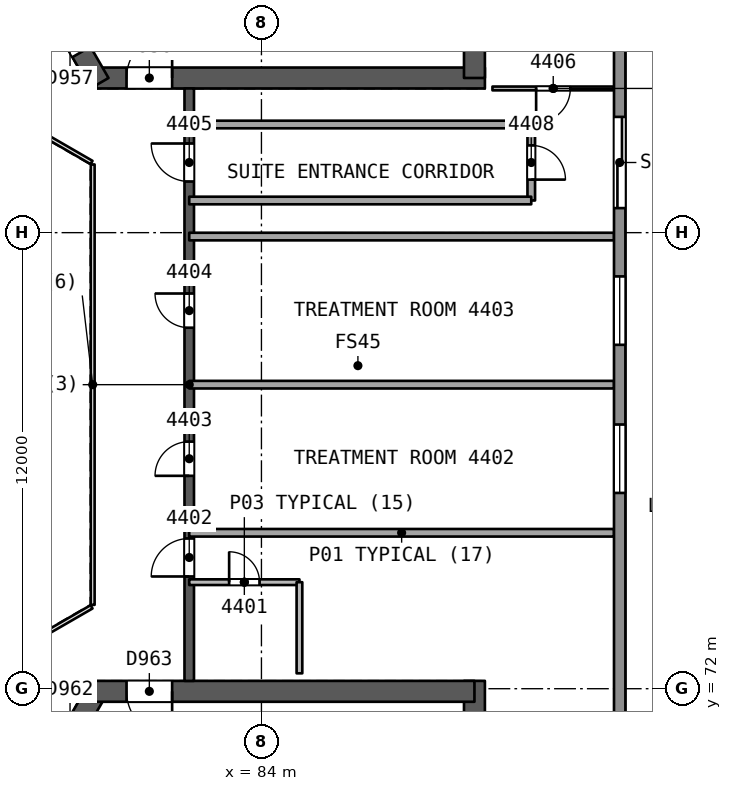
"""IFC4 building model, lengths in metres.
Left out: names, types, materials, properties, quantities, classifications, styles, units other than length and angle.
Written with IfcOpenShell. Run it as: python <this file> out.ifc"""

import sys

from ifc_helpers import new_model, si_unit, direction, frame, frame_2d, origin, place, context, subcontext, project, spatial, rectangle, extrude, element, fill, save


model = new_model("IFC4")
c1 = context("Model", 3, precision=1e-05, world=origin(), true_north=direction((0.0, 1.0)))
c2 = subcontext(c1, "Body", "Model", "MODEL_VIEW")
j1 = project(units=[si_unit("LENGTHUNIT", "METRE"), si_unit("PLANEANGLEUNIT", "RADIAN")], contexts=[c1])
p1 = place(None, origin())
s1 = spatial("IfcSite", under=j1, at=p1, CompositionType="ELEMENT")
p2 = place(p1, origin())
s2 = spatial("IfcBuilding", under=s1, at=p2, CompositionType="ELEMENT")
p3 = place(p2, frame((0.0, 0.0, 182.2)))
s3 = spatial("IfcBuildingStorey", under=s2, at=p3, CompositionType="ELEMENT", Elevation=182.2)
p4 = place(p3, frame((79.659, 88.069, 0.0), z_axis=(0.0, 0.0, 1.0), x_axis=(1.0, 0.0, 0.0)))
e1 = element("IfcWall", 1, at=p4, inside=s3, PredefinedType="SHEAR", context=c2, shape_type="SweptSolid", body=[
    extrude(rectangle(XDim=10.221, YDim=0.55, at=frame_2d((5.111, 0.0))), origin(), (0.0, 0.0, 1.0), 3.7),
])
p5 = place(p4, frame((0.791, 0.0, 0.0)))
e2 = element("IfcOpeningElement", 2, at=p5, cuts=e1, PredefinedType="OPENING", context=c2, shape_type="SweptSolid", body=[
    extrude(rectangle(XDim=1.2, YDim=2.1, at=frame_2d((0.6, 1.05))), frame((0.0, 0.286, 0.0), z_axis=(0.0, -1.0, 0.0), x_axis=(1.0, 0.0, 0.0)), (0.0, 0.0, 1.0), 0.571),
])
p6 = place(p3, frame((89.605, 88.069, 0.0), z_axis=(0.0, 0.0, 1.0), x_axis=(0.0, 1.0, 0.0)))
e3 = element("IfcWall", 3, at=p6, inside=s3, PredefinedType="SHEAR", context=c2, shape_type="SweptSolid", body=[
    extrude(rectangle(XDim=14.058, YDim=0.55, at=frame_2d((7.029, 0.0))), origin(), (0.0, 0.0, 1.0), 3.7),
])
p7 = place(p3, frame((74.686, 96.683, 0.0), z_axis=(0.0, 0.0, 1.0), x_axis=(0.499997818338, -0.866026663364, 0.0)))
e4 = element("IfcWall", 4, at=p7, inside=s3, PredefinedType="SHEAR", context=c2, shape_type="SweptSolid", body=[
    extrude(rectangle(XDim=10.105, YDim=0.55, at=frame_2d((5.052, 0.0))), origin(), (0.0, 0.0, 1.0), 3.7),
])
p8 = place(p7, frame((7.955, 0.0, 0.0)))
e5 = element("IfcOpeningElement", 5, at=p8, cuts=e4, PredefinedType="OPENING", context=c2, shape_type="SweptSolid", body=[
    extrude(rectangle(XDim=1.2, YDim=2.1, at=frame_2d((0.6, 1.05))), frame((0.0, 0.286, 0.0), z_axis=(0.0, -1.0, 0.0), x_axis=(1.0, 0.0, 0.0)), (0.0, 0.0, 1.0), 0.571),
])
p9 = place(p3, frame((79.659, 71.931, 0.0), z_axis=(0.0, 0.0, 1.0), x_axis=(-0.500000202252, -0.866025287014, 0.0)))
e6 = element("IfcWall", 6, at=p9, inside=s3, PredefinedType="SHEAR", context=c2, shape_type="SweptSolid", body=[
    extrude(rectangle(XDim=10.221, YDim=0.55, at=frame_2d((5.111, 0.0))), origin(), (0.0, 0.0, 1.0), 3.7),
])
p10 = place(p9, frame((0.791, 0.0, 0.0)))
e7 = element("IfcOpeningElement", 7, at=p10, cuts=e6, PredefinedType="OPENING", context=c2, shape_type="SweptSolid", body=[
    extrude(rectangle(XDim=1.2, YDim=2.1, at=frame_2d((0.6, 1.05))), frame((0.0, 0.286, 0.0), z_axis=(0.0, -1.0, 0.0), x_axis=(1.0, 0.0, 0.0)), (0.0, 0.0, 1.0), 0.571),
])
p11 = place(p3, frame((89.605, 58.031, 0.0), z_axis=(0.0, 0.0, 1.0), x_axis=(0.0, 1.0, 0.0)))
e8 = element("IfcWall", 8, at=p11, inside=s3, PredefinedType="SHEAR", context=c2, shape_type="SweptSolid", body=[
    extrude(rectangle(XDim=14.175, YDim=0.55, at=frame_2d((7.087, 0.0))), origin(), (0.0, 0.0, 1.0), 3.7),
])
p12 = place(p3, frame((89.605, 71.931, 0.0), z_axis=(0.0, 0.0, 1.0), x_axis=(-1.0, 0.0, 0.0)))
e9 = element("IfcWall", 9, at=p12, inside=s3, PredefinedType="SHEAR", context=c2, shape_type="SweptSolid", body=[
    extrude(rectangle(XDim=10.105, YDim=0.55, at=frame_2d((5.052, 0.0))), origin(), (0.0, 0.0, 1.0), 3.7),
])
p13 = place(p12, frame((7.955, 0.0, 0.0)))
e10 = element("IfcOpeningElement", 10, at=p13, cuts=e9, PredefinedType="OPENING", context=c2, shape_type="SweptSolid", body=[
    extrude(rectangle(XDim=1.2, YDim=2.1, at=frame_2d((0.6, 1.05))), frame((0.0, 0.286, 0.0), z_axis=(0.0, -1.0, 0.0), x_axis=(1.0, 0.0, 0.0)), (0.0, 0.0, 1.0), 0.571),
])
p14 = place(p3, frame((82.1, 72.206, 0.0), z_axis=(0.0, 0.0, 1.0), x_axis=(0.0, 1.0, 0.0)))
e11 = element("IfcWall", 11, at=p14, inside=s3, PredefinedType="SHEAR", context=c2, shape_type="SweptSolid", body=[
    extrude(rectangle(XDim=15.588, YDim=0.25, at=frame_2d((7.794, 0.0))), origin(), (0.0, 0.0, 1.0), 3.25),
])
p15 = place(p14, frame((2.747, 0.0, 0.0)))
e12 = element("IfcOpeningElement", 12, at=p15, cuts=e11, PredefinedType="OPENING", context=c2, shape_type="SweptSolid", body=[
    extrude(rectangle(XDim=1.0, YDim=2.1, at=frame_2d((0.5, 1.05))), frame((0.0, 0.135, 0.0), z_axis=(0.0, -1.0, 0.0), x_axis=(1.0, 0.0, 0.0)), (0.0, 0.0, 1.0), 0.271),
])
p16 = place(p14, frame((5.396, 0.0, 0.0)))
e13 = element("IfcOpeningElement", 13, at=p16, cuts=e11, PredefinedType="OPENING", context=c2, shape_type="SweptSolid", body=[
    extrude(rectangle(XDim=0.9, YDim=2.1, at=frame_2d((0.45, 1.05))), frame((0.0, 0.135, 0.0), z_axis=(0.0, -1.0, 0.0), x_axis=(1.0, 0.0, 0.0)), (0.0, 0.0, 1.0), 0.271),
])
p17 = place(p14, frame((9.293, 0.0, 0.0)))
e14 = element("IfcOpeningElement", 14, at=p17, cuts=e11, PredefinedType="OPENING", context=c2, shape_type="SweptSolid", body=[
    extrude(rectangle(XDim=0.9, YDim=2.1, at=frame_2d((0.45, 1.05))), frame((0.0, 0.135, 0.0), z_axis=(0.0, -1.0, 0.0), x_axis=(1.0, 0.0, 0.0)), (0.0, 0.0, 1.0), 0.271),
])
p18 = place(p14, frame((13.14, 0.0, 0.0)))
e15 = element("IfcOpeningElement", 15, at=p18, cuts=e11, PredefinedType="OPENING", context=c2, shape_type="SweptSolid", body=[
    extrude(rectangle(XDim=1.0, YDim=2.1, at=frame_2d((0.5, 1.05))), frame((0.0, 0.135, 0.0), z_axis=(0.0, -1.0, 0.0), x_axis=(1.0, 0.0, 0.0)), (0.0, 0.0, 1.0), 0.271),
])
p19 = place(p3, frame((82.1, 74.803, 0.0), z_axis=(0.0, 0.0, 1.0), x_axis=(1.0, 0.0, 0.0)))
e16 = element("IfcWall", 16, at=p19, inside=s3, PredefinedType="PARTITIONING", context=c2, shape_type="SweptSolid", body=[
    extrude(rectangle(XDim=2.9, YDim=0.15, at=frame_2d((1.45, 0.0))), origin(), (0.0, 0.0, 1.0), 3.25),
])
p20 = place(p19, frame((1.05, 0.0, 0.0)))
e17 = element("IfcOpeningElement", 17, at=p20, cuts=e16, PredefinedType="OPENING", context=c2, shape_type="SweptSolid", body=[
    extrude(rectangle(XDim=0.8, YDim=2.1, at=frame_2d((0.4, 1.05))), frame((0.0, 0.085, 0.0), z_axis=(0.0, -1.0, 0.0), x_axis=(1.0, 0.0, 0.0)), (0.0, 0.0, 1.0), 0.171),
])
p21 = place(p3, frame((85.0, 74.803, 0.0), z_axis=(0.0, 0.0, 1.0), x_axis=(0.0, -1.0, 0.0)))
e18 = element("IfcWall", 18, at=p21, inside=s3, PredefinedType="PARTITIONING", context=c2, shape_type="SweptSolid", body=[
    extrude(rectangle(XDim=2.398, YDim=0.15, at=frame_2d((1.199, 0.0))), origin(), (0.0, 0.0, 1.0), 3.25),
])
for number, where, z_axis, x_axis in (
    (19, (93.278, 76.103, 0.0), (0.0, 0.0, 1.0), (-1.0, 0.0, 0.0)),
    (20, (93.278, 80.0, 0.0), (0.0, 0.0, 1.0), (-1.0, 0.0, 0.0)),
    (21, (93.278, 83.897, 0.0), (0.0, 0.0, 1.0), (-1.0, 0.0, 0.0)),
):
    element("IfcWall", number, at=place(p3, frame(where, z_axis=z_axis, x_axis=x_axis)), inside=s3, PredefinedType="PARTITIONING", context=c2, shape_type="SweptSolid", body=[
        extrude(rectangle(XDim=11.178, YDim=0.2, at=frame_2d((5.589, 0.0))), origin(), (0.0, 0.0, 1.0), 3.25),
    ])
p22 = place(p3, frame((93.278, 87.794, 0.0), z_axis=(0.0, 0.0, 1.0), x_axis=(-1.0, 0.0, 0.0)))
e22 = element("IfcWall", 22, at=p22, inside=s3, PredefinedType="PARTITIONING", context=c2, shape_type="SweptSolid", body=[
    extrude(rectangle(XDim=3.199, YDim=0.1, at=frame_2d((1.6, 0.0))), origin(), (0.0, 0.0, 1.0), 3.25),
])
p23 = place(p22, frame((1.15, 0.0, 0.0)))
e23 = element("IfcOpeningElement", 23, at=p23, cuts=e22, PredefinedType="OPENING", context=c2, shape_type="SweptSolid", body=[
    extrude(rectangle(XDim=0.9, YDim=2.1, at=frame_2d((0.45, 1.05))), frame((0.0, 0.061, 0.0), z_axis=(0.0, -1.0, 0.0), x_axis=(1.0, 0.0, 0.0)), (0.0, 0.0, 1.0), 0.121),
])
p24 = place(p3, frame((82.1, 86.846, 0.0), z_axis=(0.0, 0.0, 1.0), x_axis=(1.0, 0.0, 0.0)))
e24 = element("IfcWall", 24, at=p24, inside=s3, PredefinedType="PARTITIONING", context=c2, shape_type="SweptSolid", body=[
    extrude(rectangle(XDim=9.0, YDim=0.2, at=frame_2d((4.5, 0.0))), origin(), (0.0, 0.0, 1.0), 3.25),
])
p25 = place(p3, frame((91.1, 86.846, 0.0), z_axis=(0.0, 0.0, 1.0), x_axis=(0.0, -1.0, 0.0)))
e25 = element("IfcWall", 25, at=p25, inside=s3, PredefinedType="PARTITIONING", context=c2, shape_type="SweptSolid", body=[
    extrude(rectangle(XDim=2.0, YDim=0.2, at=frame_2d((1.0, 0.0))), origin(), (0.0, 0.0, 1.0), 3.25),
])
p26 = place(p25, frame((0.55, 0.0, 0.0)))
e26 = element("IfcOpeningElement", 26, at=p26, cuts=e25, PredefinedType="OPENING", context=c2, shape_type="SweptSolid", body=[
    extrude(rectangle(XDim=0.9, YDim=2.1, at=frame_2d((0.45, 1.05))), frame((0.0, 0.11, 0.0), z_axis=(0.0, -1.0, 0.0), x_axis=(1.0, 0.0, 0.0)), (0.0, 0.0, 1.0), 0.221),
])
p27 = place(p3, frame((91.1, 84.846, 0.0), z_axis=(0.0, 0.0, 1.0), x_axis=(-1.0, 0.0, 0.0)))
e27 = element("IfcWall", 27, at=p27, inside=s3, PredefinedType="PARTITIONING", context=c2, shape_type="SweptSolid", body=[
    extrude(rectangle(XDim=9.0, YDim=0.2, at=frame_2d((4.5, 0.0))), origin(), (0.0, 0.0, 1.0), 3.25),
])
p28 = place(p3, frame((93.427, 106.495, 0.0), z_axis=(0.0, 0.0, 1.0), x_axis=(0.0, -1.0, 0.0)))
e28 = element("IfcWall", 28, at=p28, inside=s3, PredefinedType="SOLIDWALL", context=c2, shape_type="SweptSolid", body=[
    extrude(rectangle(XDim=52.991, YDim=0.3, at=frame_2d((26.495, 0.0))), origin(), (0.0, 0.0, 1.0), 3.25),
])
p29 = place(p28, frame((19.45, 0.0, 0.0)))
e29 = element("IfcOpeningElement", 29, at=p29, cuts=e28, PredefinedType="OPENING", context=c2, shape_type="SweptSolid", body=[
    extrude(rectangle(XDim=2.4, YDim=2.4, at=frame_2d((1.2, 1.2))), frame((0.0, 0.161, 0.0), z_axis=(0.0, -1.0, 0.0), x_axis=(1.0, 0.0, 0.0)), (0.0, 0.0, 1.0), 0.321),
])
p30 = place(p28, frame((9.392, 0.0, 0.0)))
e30 = element("IfcOpeningElement", 30, at=p30, cuts=e28, PredefinedType="OPENING", context=c2, shape_type="SweptSolid", body=[
    extrude(rectangle(XDim=2.4, YDim=2.4, at=frame_2d((1.2, 1.2))), frame((0.0, 0.161, 0.0), z_axis=(0.0, -1.0, 0.0), x_axis=(1.0, 0.0, 0.0)), (0.0, 0.0, 1.0), 0.321),
])
p31 = place(p28, frame((40.535, 0.0, 0.0)))
e31 = element("IfcOpeningElement", 31, at=p31, cuts=e28, PredefinedType="OPENING", context=c2, shape_type="SweptSolid", body=[
    extrude(rectangle(XDim=2.4, YDim=2.4, at=frame_2d((1.2, 1.2))), frame((0.0, 0.161, 0.0), z_axis=(0.0, -1.0, 0.0), x_axis=(1.0, 0.0, 0.0)), (0.0, 0.0, 1.0), 0.321),
])
p32 = place(p28, frame((27.544, 0.0, 0.9)))
e32 = element("IfcOpeningElement", 32, at=p32, cuts=e28, PredefinedType="OPENING", context=c2, shape_type="SweptSolid", body=[
    extrude(rectangle(XDim=1.8, YDim=1.5, at=frame_2d((0.9, 0.75))), frame((0.0, 0.161, 0.0), z_axis=(0.0, -1.0, 0.0), x_axis=(1.0, 0.0, 0.0)), (0.0, 0.0, 1.0), 0.321),
])
p33 = place(p28, frame((23.647, 0.0, 0.9)))
e33 = element("IfcOpeningElement", 33, at=p33, cuts=e28, PredefinedType="OPENING", context=c2, shape_type="SweptSolid", body=[
    extrude(rectangle(XDim=1.8, YDim=1.5, at=frame_2d((0.9, 0.75))), frame((0.0, 0.161, 0.0), z_axis=(0.0, -1.0, 0.0), x_axis=(1.0, 0.0, 0.0)), (0.0, 0.0, 1.0), 0.321),
])
p34 = place(p3, frame((42.841, 82.711, 0.0), z_axis=(0.0, 0.0, 1.0), x_axis=(0.866024774967, 0.500001089142, 0.0)))
e34 = element("IfcWall", 34, at=p34, inside=s3, PredefinedType="SOLIDWALL", context=c2, shape_type="SweptSolid", body=[
    extrude(rectangle(XDim=52.991, YDim=0.3, at=frame_2d((26.496, 0.0))), origin(), (0.0, 0.0, 1.0), 3.25),
])
p35 = place(p34, frame((20.619, 0.0, 0.0)))
e35 = element("IfcOpeningElement", 35, at=p35, cuts=e34, PredefinedType="OPENING", context=c2, shape_type="SweptSolid", body=[
    extrude(rectangle(XDim=2.4, YDim=2.4, at=frame_2d((1.2, 1.2))), frame((0.0, 0.161, 0.0), z_axis=(0.0, -1.0, 0.0), x_axis=(1.0, 0.0, 0.0)), (0.0, 0.0, 1.0), 0.321),
])
p36 = place(p34, frame((9.392, 0.0, 0.0)))
e36 = element("IfcOpeningElement", 36, at=p36, cuts=e34, PredefinedType="OPENING", context=c2, shape_type="SweptSolid", body=[
    extrude(rectangle(XDim=2.4, YDim=2.4, at=frame_2d((1.2, 1.2))), frame((0.0, 0.161, 0.0), z_axis=(0.0, -1.0, 0.0), x_axis=(1.0, 0.0, 0.0)), (0.0, 0.0, 1.0), 0.321),
])
p37 = place(p34, frame((40.145, 0.0, 0.0)))
e37 = element("IfcOpeningElement", 37, at=p37, cuts=e34, PredefinedType="OPENING", context=c2, shape_type="SweptSolid", body=[
    extrude(rectangle(XDim=2.4, YDim=2.4, at=frame_2d((1.2, 1.2))), frame((0.0, 0.161, 0.0), z_axis=(0.0, -1.0, 0.0), x_axis=(1.0, 0.0, 0.0)), (0.0, 0.0, 1.0), 0.321),
])
p38 = place(p34, frame((26.375, 0.0, 0.9)))
e38 = element("IfcOpeningElement", 38, at=p38, cuts=e34, PredefinedType="OPENING", context=c2, shape_type="SweptSolid", body=[
    extrude(rectangle(XDim=1.8, YDim=1.5, at=frame_2d((0.9, 0.75))), frame((0.0, 0.161, 0.0), z_axis=(0.0, -1.0, 0.0), x_axis=(1.0, 0.0, 0.0)), (0.0, 0.0, 1.0), 0.321),
])
p39 = place(p3, frame((88.732, 50.794, 0.0), z_axis=(0.0, 0.0, 1.0), x_axis=(-0.866024774967, 0.500001089142, 0.0)))
e39 = element("IfcWall", 39, at=p39, inside=s3, PredefinedType="SOLIDWALL", context=c2, shape_type="SweptSolid", body=[
    extrude(rectangle(XDim=52.991, YDim=0.3, at=frame_2d((26.496, 0.0))), origin(), (0.0, 0.0, 1.0), 3.25),
])
p40 = place(p39, frame((19.06, 0.0, 0.0)))
e40 = element("IfcOpeningElement", 40, at=p40, cuts=e39, PredefinedType="OPENING", context=c2, shape_type="SweptSolid", body=[
    extrude(rectangle(XDim=2.4, YDim=2.4, at=frame_2d((1.2, 1.2))), frame((0.0, 0.161, 0.0), z_axis=(0.0, -1.0, 0.0), x_axis=(1.0, 0.0, 0.0)), (0.0, 0.0, 1.0), 0.321),
])
p41 = place(p39, frame((9.392, 0.0, 0.0)))
e41 = element("IfcOpeningElement", 41, at=p41, cuts=e39, PredefinedType="OPENING", context=c2, shape_type="SweptSolid", body=[
    extrude(rectangle(XDim=2.4, YDim=2.4, at=frame_2d((1.2, 1.2))), frame((0.0, 0.161, 0.0), z_axis=(0.0, -1.0, 0.0), x_axis=(1.0, 0.0, 0.0)), (0.0, 0.0, 1.0), 0.321),
])
p42 = place(p39, frame((40.145, 0.0, 0.0)))
e42 = element("IfcOpeningElement", 42, at=p42, cuts=e39, PredefinedType="OPENING", context=c2, shape_type="SweptSolid", body=[
    extrude(rectangle(XDim=2.4, YDim=2.4, at=frame_2d((1.2, 1.2))), frame((0.0, 0.161, 0.0), z_axis=(0.0, -1.0, 0.0), x_axis=(1.0, 0.0, 0.0)), (0.0, 0.0, 1.0), 0.321),
])
p43 = place(p39, frame((26.765, 0.0, 0.9)))
e43 = element("IfcOpeningElement", 43, at=p43, cuts=e39, PredefinedType="OPENING", context=c2, shape_type="SweptSolid", body=[
    extrude(rectangle(XDim=1.8, YDim=1.5, at=frame_2d((0.9, 0.75))), frame((0.0, 0.161, 0.0), z_axis=(0.0, -1.0, 0.0), x_axis=(1.0, 0.0, 0.0)), (0.0, 0.0, 1.0), 0.321),
])
p44 = place(p39, frame((22.867, 0.0, 0.9)))
e44 = element("IfcOpeningElement", 44, at=p44, cuts=e39, PredefinedType="OPENING", context=c2, shape_type="SweptSolid", body=[
    extrude(rectangle(XDim=1.8, YDim=1.5, at=frame_2d((0.9, 0.75))), frame((0.0, 0.161, 0.0), z_axis=(0.0, -1.0, 0.0), x_axis=(1.0, 0.0, 0.0)), (0.0, 0.0, 1.0), 0.321),
])
p45 = place(p3, frame((79.56, 74.206, 0.0), z_axis=(0.0, 0.0, 1.0), x_axis=(0.0, 1.0, 0.0)))
e45 = element("IfcWall", 45, at=p45, inside=s3, PredefinedType="PARTITIONING", context=c2, shape_type="SweptSolid", body=[
    extrude(rectangle(XDim=11.588, YDim=0.1, at=frame_2d((5.794, 0.0))), origin(), (0.0, 0.0, 1.0), 3.25),
])
for number, where, z_axis, x_axis in (
    (46, (79.53, 85.846, 0.0), (0.0, 0.0, 1.0), (-0.866, 0.5, 0.0)),
    (47, (77.798, 73.154, 0.0), (0.0, 0.0, 1.0), (0.866, 0.5, 0.0)),
):
    element("IfcWall", number, at=place(p3, frame(where, z_axis=z_axis, x_axis=x_axis)), inside=s3, PredefinedType="PARTITIONING", context=c2, shape_type="SweptSolid", body=[
        extrude(rectangle(XDim=2.0, YDim=0.1, at=frame_2d((1.0, 0.0))), origin(), (0.0, 0.0, 1.0), 3.25),
    ])
p46 = place(p20, origin())
e48 = element("IfcDoor", 48, at=p46, inside=s3, OperationType="SINGLE_SWING_LEFT", PredefinedType="NOTDEFINED", context=c2, shape_type="SweptSolid", body=[
    extrude(rectangle(XDim=0.8, YDim=2.1, at=frame_2d((0.4, 1.05))), frame((0.0, 0.025, 0.0), z_axis=(0.0, -1.0, 0.0), x_axis=(1.0, 0.0, 0.0)), (0.0, 0.0, 1.0), 0.05),
])
fill(e17, e48)
p47 = place(p15, origin())
e49 = element("IfcDoor", 49, at=p47, inside=s3, OperationType="SINGLE_SWING_LEFT", PredefinedType="NOTDEFINED", context=c2, shape_type="SweptSolid", body=[
    extrude(rectangle(XDim=1.0, YDim=2.1, at=frame_2d((0.5, 1.05))), frame((0.0, 0.025, 0.0), z_axis=(0.0, -1.0, 0.0), x_axis=(1.0, 0.0, 0.0)), (0.0, 0.0, 1.0), 0.05),
])
fill(e12, e49)
p48 = place(p16, origin())
e50 = element("IfcDoor", 50, at=p48, inside=s3, OperationType="SINGLE_SWING_LEFT", PredefinedType="NOTDEFINED", context=c2, shape_type="SweptSolid", body=[
    extrude(rectangle(XDim=0.9, YDim=2.1, at=frame_2d((0.45, 1.05))), frame((0.0, 0.025, 0.0), z_axis=(0.0, -1.0, 0.0), x_axis=(1.0, 0.0, 0.0)), (0.0, 0.0, 1.0), 0.05),
])
fill(e13, e50)
p49 = place(p17, origin())
e51 = element("IfcDoor", 51, at=p49, inside=s3, OperationType="SINGLE_SWING_RIGHT", PredefinedType="NOTDEFINED", context=c2, shape_type="SweptSolid", body=[
    extrude(rectangle(XDim=0.9, YDim=2.1, at=frame_2d((0.45, 1.05))), frame((0.0, 0.025, 0.0), z_axis=(0.0, -1.0, 0.0), x_axis=(1.0, 0.0, 0.0)), (0.0, 0.0, 1.0), 0.05),
])
fill(e14, e51)
p50 = place(p18, origin())
e52 = element("IfcDoor", 52, at=p50, inside=s3, OperationType="SINGLE_SWING_RIGHT", PredefinedType="NOTDEFINED", context=c2, shape_type="SweptSolid", body=[
    extrude(rectangle(XDim=1.0, YDim=2.1, at=frame_2d((0.5, 1.05))), frame((0.0, 0.025, 0.0), z_axis=(0.0, -1.0, 0.0), x_axis=(1.0, 0.0, 0.0)), (0.0, 0.0, 1.0), 0.05),
])
fill(e15, e52)
p51 = place(p23, origin())
e53 = element("IfcDoor", 53, at=p51, inside=s3, OperationType="SINGLE_SWING_RIGHT", PredefinedType="NOTDEFINED", context=c2, shape_type="SweptSolid", body=[
    extrude(rectangle(XDim=0.9, YDim=2.1, at=frame_2d((0.45, 1.05))), frame((0.0, 0.025, 0.0), z_axis=(0.0, -1.0, 0.0), x_axis=(1.0, 0.0, 0.0)), (0.0, 0.0, 1.0), 0.05),
])
fill(e23, e53)
p52 = place(p26, origin())
e54 = element("IfcDoor", 54, at=p52, inside=s3, OperationType="SINGLE_SWING_RIGHT", PredefinedType="NOTDEFINED", context=c2, shape_type="SweptSolid", body=[
    extrude(rectangle(XDim=0.9, YDim=2.1, at=frame_2d((0.45, 1.05))), frame((0.0, 0.025, 0.0), z_axis=(0.0, -1.0, 0.0), x_axis=(1.0, 0.0, 0.0)), (0.0, 0.0, 1.0), 0.05),
])
fill(e26, e54)
p53 = place(p29, origin())
e55 = element("IfcDoor", 55, at=p53, inside=s3, OperationType="SLIDING_TO_LEFT", PredefinedType="NOTDEFINED", context=c2, shape_type="SweptSolid", body=[
    extrude(rectangle(XDim=2.4, YDim=2.4, at=frame_2d((1.2, 1.2))), frame((0.0, 0.025, 0.0), z_axis=(0.0, -1.0, 0.0), x_axis=(1.0, 0.0, 0.0)), (0.0, 0.0, 1.0), 0.05),
])
fill(e29, e55)
p54 = place(p32, origin())
e56 = element("IfcWindow", 56, at=p54, inside=s3, PartitioningType="SINGLE_PANEL", PredefinedType="WINDOW", context=c2, shape_type="SweptSolid", body=[
    extrude(rectangle(XDim=1.8, YDim=1.5, at=frame_2d((0.9, 0.75))), frame((0.0, 0.03, 0.0), z_axis=(0.0, -1.0, 0.0), x_axis=(1.0, 0.0, 0.0)), (0.0, 0.0, 1.0), 0.06),
])
fill(e32, e56)
p55 = place(p33, origin())
e57 = element("IfcWindow", 57, at=p55, inside=s3, PartitioningType="SINGLE_PANEL", PredefinedType="WINDOW", context=c2, shape_type="SweptSolid", body=[
    extrude(rectangle(XDim=1.8, YDim=1.5, at=frame_2d((0.9, 0.75))), frame((0.0, 0.03, 0.0), z_axis=(0.0, -1.0, 0.0), x_axis=(1.0, 0.0, 0.0)), (0.0, 0.0, 1.0), 0.06),
])
fill(e33, e57)
p56 = place(p5, origin())
e58 = element("IfcDoor", 58, at=p56, inside=s3, OperationType="SINGLE_SWING_RIGHT", PredefinedType="NOTDEFINED", context=c2, shape_type="SweptSolid", body=[
    extrude(rectangle(XDim=1.2, YDim=2.1, at=frame_2d((0.6, 1.05))), frame((0.0, 0.025, 0.0), z_axis=(0.0, -1.0, 0.0), x_axis=(1.0, 0.0, 0.0)), (0.0, 0.0, 1.0), 0.05),
])
fill(e2, e58)
p57 = place(p8, origin())
e59 = element("IfcDoor", 59, at=p57, inside=s3, OperationType="SINGLE_SWING_LEFT", PredefinedType="NOTDEFINED", context=c2, shape_type="SweptSolid", body=[
    extrude(rectangle(XDim=1.2, YDim=2.1, at=frame_2d((0.6, 1.05))), frame((0.0, 0.025, 0.0), z_axis=(0.0, -1.0, 0.0), x_axis=(1.0, 0.0, 0.0)), (0.0, 0.0, 1.0), 0.05),
])
fill(e5, e59)
p58 = place(p13, origin())
e60 = element("IfcDoor", 60, at=p58, inside=s3, OperationType="SINGLE_SWING_LEFT", PredefinedType="NOTDEFINED", context=c2, shape_type="SweptSolid", body=[
    extrude(rectangle(XDim=1.2, YDim=2.1, at=frame_2d((0.6, 1.05))), frame((0.0, 0.025, 0.0), z_axis=(0.0, -1.0, 0.0), x_axis=(1.0, 0.0, 0.0)), (0.0, 0.0, 1.0), 0.05),
])
fill(e10, e60)
save(model, sys.argv[1])
